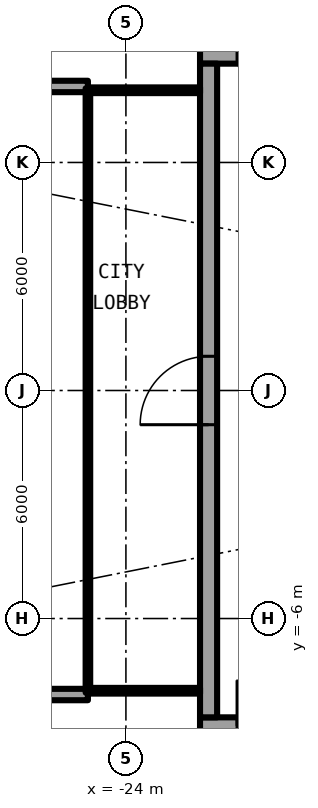
"""IFC4 building model, lengths in metres.
Left out: names, types, materials, properties, quantities, classifications, styles, units other than length and angle.
Written with IfcOpenShell. Run it as: python <this file> out.ifc"""

import sys

from ifc_helpers import new_model, si_unit, direction, frame, frame_2d, origin, place, context, subcontext, project, spatial, rectangle, extrude, element, fill, save


model = new_model("IFC4")
c1 = context("Model", 3, precision=1e-05, world=origin(), true_north=direction((0.0, 1.0)))
c2 = subcontext(c1, "Body", "Model", "MODEL_VIEW")
j1 = project(units=[si_unit("LENGTHUNIT", "METRE"), si_unit("PLANEANGLEUNIT", "RADIAN")], contexts=[c1])
p1 = place(None, origin())
s1 = spatial("IfcSite", under=j1, at=p1, CompositionType="ELEMENT")
p2 = place(p1, origin())
s2 = spatial("IfcBuilding", under=s1, at=p2, CompositionType="ELEMENT")
p3 = place(p2, frame((0.0, 0.0, 190.2)))
s3 = spatial("IfcBuildingStorey", under=s2, at=p3, CompositionType="ELEMENT", Elevation=190.2)
for number, where, z_axis, x_axis in (
    (1, (-25.0, 8.0, 0.0), (0.0, 0.0, 1.0), (-1.0, 0.0, 0.0)),
    (2, (-25.0, -8.0, 0.0), (0.0, 0.0, 1.0), (-1.0, 0.0, 0.0)),
):
    element("IfcWall", number, at=place(p3, frame(where, z_axis=z_axis, x_axis=x_axis)), inside=s3, PredefinedType="SOLIDWALL", context=c2, shape_type="SweptSolid", body=[
        extrude(rectangle(XDim=2.667, YDim=0.3, at=frame_2d((1.333, 0.0))), origin(), (0.0, 0.0, 1.0), 2.7),
    ])
p4 = place(p3, frame((-22.05, -8.825, 0.0), z_axis=(0.0, 0.0, 1.0), x_axis=(1.0, 0.0, 0.0)))
e3 = element("IfcWall", 3, at=p4, inside=s3, PredefinedType="SHEAR", context=c2, shape_type="SweptSolid", body=[
    extrude(rectangle(XDim=13.5, YDim=0.45, at=frame_2d((6.75, 0.0))), origin(), (0.0, 0.0, 1.0), 3.05),
])
p5 = place(p4, frame((0.975, 0.0, 0.0)))
e4 = element("IfcOpeningElement", 4, at=p5, cuts=e3, PredefinedType="OPENING", context=c2, shape_type="SweptSolid", body=[
    extrude(rectangle(XDim=1.2, YDim=2.3, at=frame_2d((0.6, 1.15))), frame((0.0, 0.235, 0.0), z_axis=(0.0, -1.0, 0.0), x_axis=(1.0, 0.0, 0.0)), (0.0, 0.0, 1.0), 0.47),
])
p6 = place(p3, frame((-8.55, 8.825, 0.0), z_axis=(0.0, 0.0, 1.0), x_axis=(-1.0, 0.0, 0.0)))
e5 = element("IfcWall", 5, at=p6, inside=s3, PredefinedType="SHEAR", context=c2, shape_type="SweptSolid", body=[
    extrude(rectangle(XDim=13.5, YDim=0.45, at=frame_2d((6.75, 0.0))), origin(), (0.0, 0.0, 1.0), 3.05),
])
p7 = place(p6, frame((11.325, 0.0, 0.0)))
e6 = element("IfcOpeningElement", 6, at=p7, cuts=e5, PredefinedType="OPENING", context=c2, shape_type="SweptSolid", body=[
    extrude(rectangle(XDim=1.2, YDim=2.3, at=frame_2d((0.6, 1.15))), frame((0.0, 0.235, 0.0), z_axis=(0.0, -1.0, 0.0), x_axis=(1.0, 0.0, 0.0)), (0.0, 0.0, 1.0), 0.47),
])
p8 = place(p3, frame((-21.825, -8.6, 0.0), z_axis=(0.0, 0.0, 1.0), x_axis=(0.0, 1.0, 0.0)))
e7 = element("IfcWall", 7, at=p8, inside=s3, PredefinedType="SHEAR", context=c2, shape_type="SweptSolid", body=[
    extrude(rectangle(XDim=17.2, YDim=0.45, at=frame_2d((8.6, 0.0))), origin(), (0.0, 0.0, 1.0), 3.05),
])
p9 = place(p8, frame((7.7, 0.0, 0.0)))
e8 = element("IfcOpeningElement", 8, at=p9, cuts=e7, PredefinedType="OPENING", context=c2, shape_type="SweptSolid", body=[
    extrude(rectangle(XDim=1.8, YDim=2.3, at=frame_2d((0.9, 1.15))), frame((0.0, 0.235, 0.0), z_axis=(0.0, -1.0, 0.0), x_axis=(1.0, 0.0, 0.0)), (0.0, 0.0, 1.0), 0.47),
])
for number, where, z_axis, x_axis in (
    (9, (-22.05, 7.9, 0.0), (0.0, 0.0, 1.0), (-1.0, 0.0, 0.0)),
    (10, (-22.05, -7.9, 0.0), (0.0, 0.0, 1.0), (-1.0, 0.0, 0.0)),
):
    element("IfcWall", number, at=place(p3, frame(where, z_axis=z_axis, x_axis=x_axis)), inside=s3, PredefinedType="PARTITIONING", context=c2, shape_type="SweptSolid", body=[
        extrude(rectangle(XDim=2.89, YDim=0.15, at=frame_2d((1.445, 0.0))), origin(), (0.0, 0.0, 1.0), 2.7),
    ])
p10 = place(p3, frame((-25.0, 7.95, 0.0), z_axis=(0.0, 0.0, 1.0), x_axis=(0.0, -1.0, 0.0)))
e11 = element("IfcWall", 11, at=p10, inside=s3, PredefinedType="PARTITIONING", context=c2, shape_type="SweptSolid", body=[
    extrude(rectangle(XDim=15.9, YDim=0.12, at=frame_2d((7.95, 0.0))), origin(), (0.0, 0.0, 1.0), 2.7),
])
p11 = place(p10, frame((0.95, 0.0, 0.1)))
e12 = element("IfcOpeningElement", 12, at=p11, cuts=e11, PredefinedType="OPENING", context=c2, shape_type="SweptSolid", body=[
    extrude(rectangle(XDim=14.0, YDim=2.35, at=frame_2d((7.0, 1.175))), frame((0.0, 0.07, 0.0), z_axis=(0.0, -1.0, 0.0), x_axis=(1.0, 0.0, 0.0)), (0.0, 0.0, 1.0), 0.14),
])
p12 = place(p5, origin())
e13 = element("IfcDoor", 13, at=p12, inside=s3, OperationType="SINGLE_SWING_RIGHT", PredefinedType="DOOR", context=c2, shape_type="SweptSolid", body=[
    extrude(rectangle(XDim=1.2, YDim=2.3, at=frame_2d((0.6, 1.15))), frame((0.0, 0.025, 0.0), z_axis=(0.0, -1.0, 0.0), x_axis=(1.0, 0.0, 0.0)), (0.0, 0.0, 1.0), 0.05),
])
fill(e4, e13)
p13 = place(p7, origin())
e14 = element("IfcDoor", 14, at=p13, inside=s3, OperationType="SINGLE_SWING_LEFT", PredefinedType="DOOR", context=c2, shape_type="SweptSolid", body=[
    extrude(rectangle(XDim=1.2, YDim=2.3, at=frame_2d((0.6, 1.15))), frame((0.0, 0.025, 0.0), z_axis=(0.0, -1.0, 0.0), x_axis=(1.0, 0.0, 0.0)), (0.0, 0.0, 1.0), 0.05),
])
fill(e6, e14)
p14 = place(p9, origin())
e15 = element("IfcDoor", 15, at=p14, inside=s3, OperationType="SINGLE_SWING_LEFT", PredefinedType="DOOR", context=c2, shape_type="SweptSolid", body=[
    extrude(rectangle(XDim=1.8, YDim=2.3, at=frame_2d((0.9, 1.15))), frame((0.0, 0.025, 0.0), z_axis=(0.0, -1.0, 0.0), x_axis=(1.0, 0.0, 0.0)), (0.0, 0.0, 1.0), 0.05),
])
fill(e8, e15)
p15 = place(p11, origin())
e16 = element("IfcWindow", 16, at=p15, inside=s3, PartitioningType="SINGLE_PANEL", PredefinedType="WINDOW", context=c2, shape_type="SweptSolid", body=[
    extrude(rectangle(XDim=14.0, YDim=2.35, at=frame_2d((7.0, 1.175))), frame((0.0, 0.03, 0.0), z_axis=(0.0, -1.0, 0.0), x_axis=(1.0, 0.0, 0.0)), (0.0, 0.0, 1.0), 0.06),
])
fill(e12, e16)
save(model, sys.argv[1])
